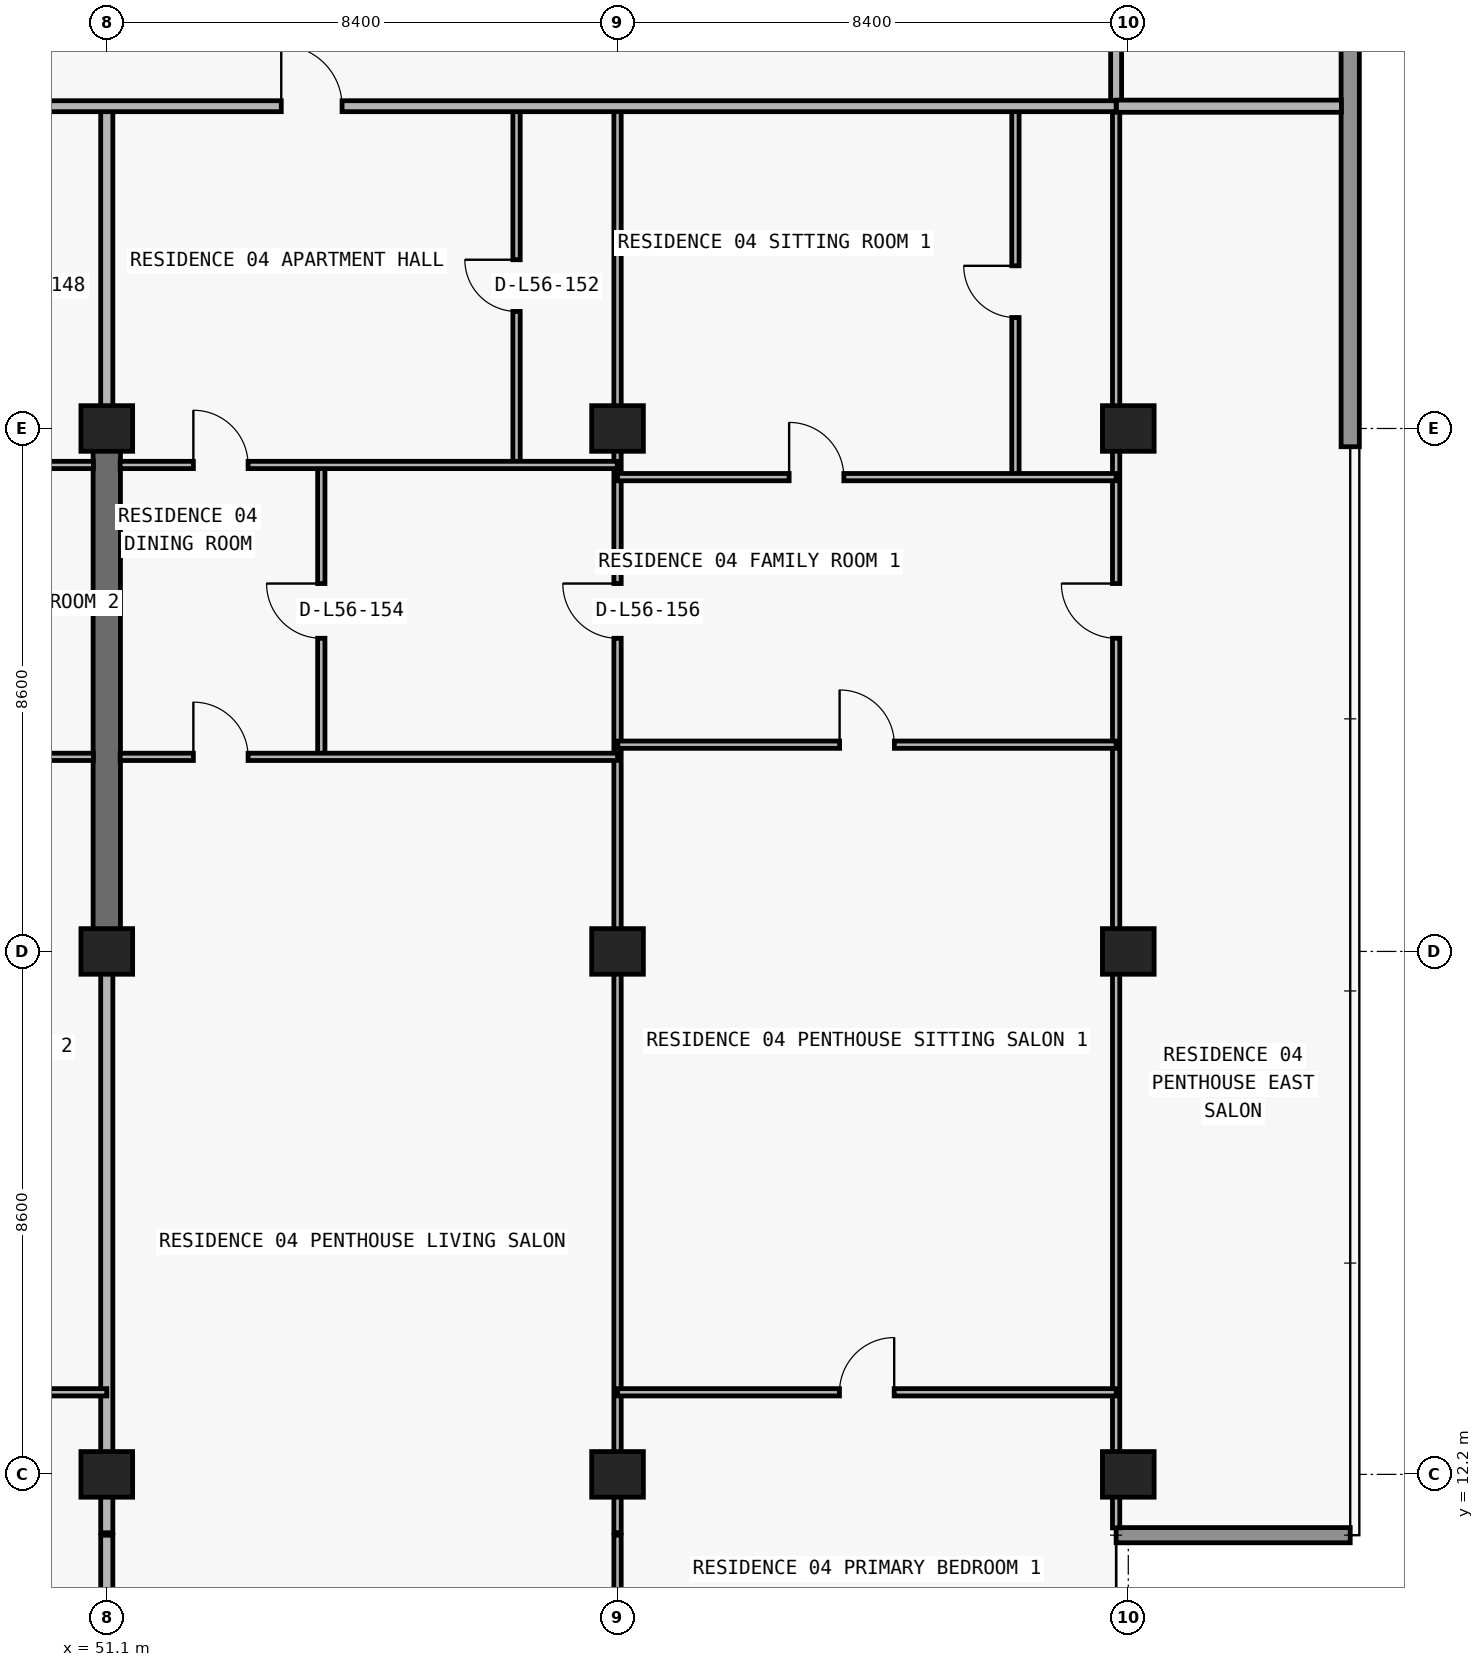
"""IFC4 building model, lengths in metres.
Left out: names, types, materials, properties, quantities, classifications, styles, units other than length and angle.
Written with IfcOpenShell. Run it as: python <this file> out.ifc"""

import sys

from ifc_helpers import new_model, si_unit, direction, frame, frame_2d, origin, origin_2d, place, context, subcontext, project, spatial, rectangle, extrude, element, fill, save


model = new_model("IFC4")
c1 = context("Model", 3, precision=1e-05, world=origin(), true_north=direction((0.0, 1.0)))
c2 = subcontext(c1, "Body", "Model", "MODEL_VIEW")
j1 = project(units=[si_unit("LENGTHUNIT", "METRE"), si_unit("PLANEANGLEUNIT", "RADIAN")], contexts=[c1])
p1 = place(None, origin())
s1 = spatial("IfcSite", under=j1, at=p1, CompositionType="ELEMENT")
p2 = place(p1, origin())
s2 = spatial("IfcBuilding", under=s1, at=p2, CompositionType="ELEMENT")
p3 = place(p2, frame((0.0, 0.0, 201.6)))
s3 = spatial("IfcBuildingStorey", under=s2, at=p3, CompositionType="ELEMENT", Elevation=201.6)
for number, where, z_axis, x_axis in (
    (1, (51.1, 12.2, 0.0), (0.0, 0.0, 1.0), (1.0, 0.0, 0.0)),
    (2, (59.5, 12.2, 0.0), (0.0, 0.0, 1.0), (1.0, 0.0, 0.0)),
    (3, (67.9, 12.2, 0.0), (0.0, 0.0, 1.0), (1.0, 0.0, 0.0)),
    (4, (51.1, 20.8, 0.0), (0.0, 0.0, 1.0), (1.0, 0.0, 0.0)),
    (5, (59.5, 20.8, 0.0), (0.0, 0.0, 1.0), (1.0, 0.0, 0.0)),
    (6, (67.9, 20.8, 0.0), (0.0, 0.0, 1.0), (1.0, 0.0, 0.0)),
    (7, (51.1, 29.4, 0.0), (0.0, 0.0, 1.0), (1.0, 0.0, 0.0)),
    (8, (59.5, 29.4, 0.0), (0.0, 0.0, 1.0), (1.0, 0.0, 0.0)),
    (9, (67.9, 29.4, 0.0), (0.0, 0.0, 1.0), (1.0, 0.0, 0.0)),
):
    element("IfcColumn", number, at=place(p3, frame(where, z_axis=z_axis, x_axis=x_axis)), inside=s3, PredefinedType="COLUMN", context=c2, shape_type="SweptSolid", body=[
        extrude(rectangle(XDim=0.85, YDim=0.75, at=origin_2d()), origin(), (0.0, 0.0, 1.0), 3.05),
    ])
p4 = place(p3, frame((51.1, 20.8, 0.0), z_axis=(0.0, 0.0, 1.0), x_axis=(0.0, 1.0, 0.0)))
e10 = element("IfcWall", 10, at=p4, inside=s3, PredefinedType="SHEAR", context=c2, shape_type="SweptSolid", body=[
    extrude(rectangle(XDim=8.6, YDim=0.45, at=frame_2d((4.3, 0.0))), origin(), (0.0, 0.0, 1.0), 3.05),
])
p5 = place(p3, frame((67.7, 11.2, 0.0), z_axis=(0.0, 0.0, 1.0), x_axis=(1.0, 0.0, 0.0)))
e11 = element("IfcWall", 11, at=p5, inside=s3, PredefinedType="ELEMENTEDWALL", context=c2, shape_type="SweptSolid", body=[
    extrude(rectangle(XDim=3.85, YDim=0.25, at=frame_2d((1.925, 0.0))), origin(), (0.0, 0.0, 1.0), 3.05),
])
p6 = place(p3, frame((71.55, 47.0, 0.0), z_axis=(0.0, 0.0, 1.0), x_axis=(0.0, -1.0, 0.0)))
e12 = element("IfcWall", 12, at=p6, inside=s3, PredefinedType="STANDARD", context=c2, shape_type="SweptSolid", body=[
    extrude(rectangle(XDim=17.9, YDim=0.3, at=frame_2d((8.95, 0.0))), origin(), (0.0, 0.0, 1.0), 3.05),
])
p7 = place(p3, frame((51.1, 7.895, 0.0), z_axis=(0.0, 0.0, 1.0), x_axis=(0.0, 1.0, 0.0)))
e13 = element("IfcWall", 13, at=p7, inside=s3, PredefinedType="PARTITIONING", context=c2, shape_type="SweptSolid", body=[
    extrude(rectangle(XDim=3.305, YDim=0.2, at=frame_2d((1.652, 0.0))), origin(), (0.0, 0.0, 1.0), 3.05),
])
p8 = place(p3, frame((51.1, 11.24, 0.0), z_axis=(0.0, 0.0, 1.0), x_axis=(0.0, 1.0, 0.0)))
e14 = element("IfcWall", 14, at=p8, inside=s3, PredefinedType="PARTITIONING", context=c2, shape_type="SweptSolid", body=[
    extrude(rectangle(XDim=9.555, YDim=0.2, at=frame_2d((4.777, 0.0))), origin(), (0.0, 0.0, 1.0), 2.263),
])
p9 = place(p3, frame((51.1, 29.405, 0.0), z_axis=(0.0, 0.0, 1.0), x_axis=(0.0, 1.0, 0.0)))
e15 = element("IfcWall", 15, at=p9, inside=s3, PredefinedType="PARTITIONING", context=c2, shape_type="SweptSolid", body=[
    extrude(rectangle(XDim=5.295, YDim=0.2, at=frame_2d((2.647, 0.0))), origin(), (0.0, 0.0, 1.0), 2.335),
])
p10 = place(p3, frame((54.628, 24.0, 0.0), z_axis=(0.0, 0.0, 1.0), x_axis=(0.0, 1.0, 0.0)))
e16 = element("IfcWall", 16, at=p10, inside=s3, PredefinedType="PARTITIONING", context=c2, shape_type="SweptSolid", body=[
    extrude(rectangle(XDim=4.8, YDim=0.12, at=frame_2d((2.4, 0.0))), origin(), (0.0, 0.0, 1.0), 3.05),
])
p11 = place(p10, frame((1.95, 0.0, 0.0)))
e17 = element("IfcOpeningElement", 17, at=p11, cuts=e16, PredefinedType="OPENING", context=c2, shape_type="SweptSolid", body=[
    extrude(rectangle(XDim=0.9, YDim=2.15, at=frame_2d((0.45, 1.075))), frame((0.0, 0.07, 0.0), z_axis=(0.0, -1.0, 0.0), x_axis=(1.0, 0.0, 0.0)), (0.0, 0.0, 1.0), 0.14),
])
p12 = place(p3, frame((57.839, 28.8, 0.0), z_axis=(0.0, 0.0, 1.0), x_axis=(0.0, 1.0, 0.0)))
e18 = element("IfcWall", 18, at=p12, inside=s3, PredefinedType="PARTITIONING", context=c2, shape_type="SweptSolid", body=[
    extrude(rectangle(XDim=5.9, YDim=0.12, at=frame_2d((2.95, 0.0))), origin(), (0.0, 0.0, 1.0), 3.05),
])
p13 = place(p12, frame((2.525, 0.0, 0.0)))
e19 = element("IfcOpeningElement", 19, at=p13, cuts=e18, PredefinedType="OPENING", context=c2, shape_type="SweptSolid", body=[
    extrude(rectangle(XDim=0.85, YDim=2.1, at=frame_2d((0.425, 1.05))), frame((0.0, 0.07, 0.0), z_axis=(0.0, -1.0, 0.0), x_axis=(1.0, 0.0, 0.0)), (0.0, 0.0, 1.0), 0.14),
])
p14 = place(p3, frame((59.5, 7.895, 0.0), z_axis=(0.0, 0.0, 1.0), x_axis=(0.0, 1.0, 0.0)))
e20 = element("IfcWall", 20, at=p14, inside=s3, PredefinedType="PARTITIONING", context=c2, shape_type="SweptSolid", body=[
    extrude(rectangle(XDim=3.305, YDim=0.12, at=frame_2d((1.652, 0.0))), origin(), (0.0, 0.0, 1.0), 3.05),
])
p15 = place(p3, frame((59.5, 11.24, 0.0), z_axis=(0.0, 0.0, 1.0), x_axis=(0.0, 1.0, 0.0)))
e21 = element("IfcWall", 21, at=p15, inside=s3, PredefinedType="PARTITIONING", context=c2, shape_type="SweptSolid", body=[
    extrude(rectangle(XDim=23.46, YDim=0.12, at=frame_2d((11.73, 0.0))), origin(), (0.0, 0.0, 1.0), 2.263),
])
p16 = place(p15, frame((14.71, 0.0, 0.0)))
e22 = element("IfcOpeningElement", 22, at=p16, cuts=e21, PredefinedType="OPENING", context=c2, shape_type="SweptSolid", body=[
    extrude(rectangle(XDim=0.9, YDim=2.15, at=frame_2d((0.45, 1.075))), frame((0.0, 0.07, 0.0), z_axis=(0.0, -1.0, 0.0), x_axis=(1.0, 0.0, 0.0)), (0.0, 0.0, 1.0), 0.14),
])
p17 = place(p3, frame((66.044, 28.6, 0.0), z_axis=(0.0, 0.0, 1.0), x_axis=(0.0, 1.0, 0.0)))
e23 = element("IfcWall", 23, at=p17, inside=s3, PredefinedType="PARTITIONING", context=c2, shape_type="SweptSolid", body=[
    extrude(rectangle(XDim=6.1, YDim=0.12, at=frame_2d((3.05, 0.0))), origin(), (0.0, 0.0, 1.0), 3.05),
])
p18 = place(p17, frame((2.625, 0.0, 0.0)))
e24 = element("IfcOpeningElement", 24, at=p18, cuts=e23, PredefinedType="OPENING", context=c2, shape_type="SweptSolid", body=[
    extrude(rectangle(XDim=0.85, YDim=2.1, at=frame_2d((0.425, 1.05))), frame((0.0, 0.07, 0.0), z_axis=(0.0, -1.0, 0.0), x_axis=(1.0, 0.0, 0.0)), (0.0, 0.0, 1.0), 0.14),
])
p19 = place(p3, frame((67.7, 11.32, 0.0), z_axis=(0.0, 0.0, 1.0), x_axis=(0.0, 1.0, 0.0)))
e25 = element("IfcWall", 25, at=p19, inside=s3, PredefinedType="PARTITIONING", context=c2, shape_type="SweptSolid", body=[
    extrude(rectangle(XDim=23.38, YDim=0.12, at=frame_2d((11.69, 0.0))), origin(), (0.0, 0.0, 1.0), 2.263),
])
p20 = place(p19, frame((14.63, 0.0, 0.0)))
e26 = element("IfcOpeningElement", 26, at=p20, cuts=e25, PredefinedType="OPENING", context=c2, shape_type="SweptSolid", body=[
    extrude(rectangle(XDim=0.9, YDim=2.15, at=frame_2d((0.45, 1.075))), frame((0.0, 0.07, 0.0), z_axis=(0.0, -1.0, 0.0), x_axis=(1.0, 0.0, 0.0)), (0.0, 0.0, 1.0), 0.14),
])
p21 = place(p3, frame((67.7, 34.705, 0.0), z_axis=(0.0, 0.0, 1.0), x_axis=(0.0, 1.0, 0.0)))
e27 = element("IfcWall", 27, at=p21, inside=s3, PredefinedType="PARTITIONING", context=c2, shape_type="SweptSolid", body=[
    extrude(rectangle(XDim=2.295, YDim=0.18, at=frame_2d((1.147, 0.0))), origin(), (0.0, 0.0, 1.0), 2.263),
])
p22 = place(p3, frame((41.2, 13.55, 0.0), z_axis=(0.0, 0.0, 1.0), x_axis=(1.0, 0.0, 0.0)))
e28 = element("IfcWall", 28, at=p22, inside=s3, PredefinedType="PARTITIONING", context=c2, shape_type="SweptSolid", body=[
    extrude(rectangle(XDim=9.9, YDim=0.12, at=frame_2d((4.95, 0.0))), origin(), (0.0, 0.0, 1.0), 3.05),
])
p23 = place(p22, frame((5.25, 0.0, 0.0)))
e29 = element("IfcOpeningElement", 29, at=p23, cuts=e28, PredefinedType="OPENING", context=c2, shape_type="SweptSolid", body=[
    extrude(rectangle(XDim=0.9, YDim=2.15, at=frame_2d((0.45, 1.075))), frame((0.0, 0.07, 0.0), z_axis=(0.0, -1.0, 0.0), x_axis=(1.0, 0.0, 0.0)), (0.0, 0.0, 1.0), 0.14),
])
p24 = place(p3, frame((59.5, 13.55, 0.0), z_axis=(0.0, 0.0, 1.0), x_axis=(1.0, 0.0, 0.0)))
e30 = element("IfcWall", 30, at=p24, inside=s3, PredefinedType="PARTITIONING", context=c2, shape_type="SweptSolid", body=[
    extrude(rectangle(XDim=8.2, YDim=0.12, at=frame_2d((4.1, 0.0))), origin(), (0.0, 0.0, 1.0), 3.05),
])
p25 = place(p24, frame((3.65, 0.0, 0.0)))
e31 = element("IfcOpeningElement", 31, at=p25, cuts=e30, PredefinedType="OPENING", context=c2, shape_type="SweptSolid", body=[
    extrude(rectangle(XDim=0.9, YDim=2.15, at=frame_2d((0.45, 1.075))), frame((0.0, 0.07, 0.0), z_axis=(0.0, -1.0, 0.0), x_axis=(1.0, 0.0, 0.0)), (0.0, 0.0, 1.0), 0.14),
])
p26 = place(p3, frame((42.7, 24.0, 0.0), z_axis=(0.0, 0.0, 1.0), x_axis=(1.0, 0.0, 0.0)))
e32 = element("IfcWall", 32, at=p26, inside=s3, PredefinedType="PARTITIONING", context=c2, shape_type="SweptSolid", body=[
    extrude(rectangle(XDim=8.18, YDim=0.12, at=frame_2d((4.09, 0.0))), origin(), (0.0, 0.0, 1.0), 3.05),
])
p27 = place(p26, frame((3.64, 0.0, 0.0)))
e33 = element("IfcOpeningElement", 33, at=p27, cuts=e32, PredefinedType="OPENING", context=c2, shape_type="SweptSolid", body=[
    extrude(rectangle(XDim=0.9, YDim=2.15, at=frame_2d((0.45, 1.075))), frame((0.0, 0.07, 0.0), z_axis=(0.0, -1.0, 0.0), x_axis=(1.0, 0.0, 0.0)), (0.0, 0.0, 1.0), 0.14),
])
p28 = place(p3, frame((51.32, 24.0, 0.0), z_axis=(0.0, 0.0, 1.0), x_axis=(1.0, 0.0, 0.0)))
e34 = element("IfcWall", 34, at=p28, inside=s3, PredefinedType="PARTITIONING", context=c2, shape_type="SweptSolid", body=[
    extrude(rectangle(XDim=8.18, YDim=0.12, at=frame_2d((4.09, 0.0))), origin(), (0.0, 0.0, 1.0), 3.05),
])
p29 = place(p28, frame((1.204, 0.0, 0.0)))
e35 = element("IfcOpeningElement", 35, at=p29, cuts=e34, PredefinedType="OPENING", context=c2, shape_type="SweptSolid", body=[
    extrude(rectangle(XDim=0.9, YDim=2.15, at=frame_2d((0.45, 1.075))), frame((0.0, 0.07, 0.0), z_axis=(0.0, -1.0, 0.0), x_axis=(1.0, 0.0, 0.0)), (0.0, 0.0, 1.0), 0.14),
])
p30 = place(p3, frame((59.505, 24.2, 0.0), z_axis=(0.0, 0.0, 1.0), x_axis=(1.0, 0.0, 0.0)))
e36 = element("IfcWall", 36, at=p30, inside=s3, PredefinedType="PARTITIONING", context=c2, shape_type="SweptSolid", body=[
    extrude(rectangle(XDim=8.195, YDim=0.12, at=frame_2d((4.098, 0.0))), origin(), (0.0, 0.0, 1.0), 3.05),
])
p31 = place(p30, frame((3.647, 0.0, 0.0)))
e37 = element("IfcOpeningElement", 37, at=p31, cuts=e36, PredefinedType="OPENING", context=c2, shape_type="SweptSolid", body=[
    extrude(rectangle(XDim=0.9, YDim=2.15, at=frame_2d((0.45, 1.075))), frame((0.0, 0.07, 0.0), z_axis=(0.0, -1.0, 0.0), x_axis=(1.0, 0.0, 0.0)), (0.0, 0.0, 1.0), 0.14),
])
p32 = place(p3, frame((59.5, 28.6, 0.0), z_axis=(0.0, 0.0, 1.0), x_axis=(1.0, 0.0, 0.0)))
e38 = element("IfcWall", 38, at=p32, inside=s3, PredefinedType="PARTITIONING", context=c2, shape_type="SweptSolid", body=[
    extrude(rectangle(XDim=8.2, YDim=0.12, at=frame_2d((4.1, 0.0))), origin(), (0.0, 0.0, 1.0), 3.05),
])
p33 = place(p32, frame((2.822, 0.0, 0.0)))
e39 = element("IfcOpeningElement", 39, at=p33, cuts=e38, PredefinedType="OPENING", context=c2, shape_type="SweptSolid", body=[
    extrude(rectangle(XDim=0.9, YDim=2.15, at=frame_2d((0.45, 1.075))), frame((0.0, 0.07, 0.0), z_axis=(0.0, -1.0, 0.0), x_axis=(1.0, 0.0, 0.0)), (0.0, 0.0, 1.0), 0.14),
])
p34 = place(p3, frame((42.705, 28.8, 0.0), z_axis=(0.0, 0.0, 1.0), x_axis=(1.0, 0.0, 0.0)))
e40 = element("IfcWall", 40, at=p34, inside=s3, PredefinedType="PARTITIONING", context=c2, shape_type="SweptSolid", body=[
    extrude(rectangle(XDim=8.175, YDim=0.12, at=frame_2d((4.087, 0.0))), origin(), (0.0, 0.0, 1.0), 3.05),
])
p35 = place(p34, frame((2.892, 0.0, 0.0)))
e41 = element("IfcOpeningElement", 41, at=p35, cuts=e40, PredefinedType="OPENING", context=c2, shape_type="SweptSolid", body=[
    extrude(rectangle(XDim=0.9, YDim=2.15, at=frame_2d((0.45, 1.075))), frame((0.0, 0.07, 0.0), z_axis=(0.0, -1.0, 0.0), x_axis=(1.0, 0.0, 0.0)), (0.0, 0.0, 1.0), 0.14),
])
p36 = place(p3, frame((51.32, 28.8, 0.0), z_axis=(0.0, 0.0, 1.0), x_axis=(1.0, 0.0, 0.0)))
e42 = element("IfcWall", 42, at=p36, inside=s3, PredefinedType="PARTITIONING", context=c2, shape_type="SweptSolid", body=[
    extrude(rectangle(XDim=8.175, YDim=0.12, at=frame_2d((4.087, 0.0))), origin(), (0.0, 0.0, 1.0), 3.05),
])
p37 = place(p36, frame((1.204, 0.0, 0.0)))
e43 = element("IfcOpeningElement", 43, at=p37, cuts=e42, PredefinedType="OPENING", context=c2, shape_type="SweptSolid", body=[
    extrude(rectangle(XDim=0.9, YDim=2.15, at=frame_2d((0.45, 1.075))), frame((0.0, 0.07, 0.0), z_axis=(0.0, -1.0, 0.0), x_axis=(1.0, 0.0, 0.0)), (0.0, 0.0, 1.0), 0.14),
])
p38 = place(p3, frame((41.2, 34.7, 0.0), z_axis=(0.0, 0.0, 1.0), x_axis=(1.0, 0.0, 0.0)))
e44 = element("IfcWall", 44, at=p38, inside=s3, PredefinedType="PARTITIONING", context=c2, shape_type="SweptSolid", body=[
    extrude(rectangle(XDim=26.5, YDim=0.18, at=frame_2d((13.25, 0.0))), origin(), (0.0, 0.0, 1.0), 3.05),
])
p39 = place(p38, frame((12.77, 0.0, 0.0)))
e45 = element("IfcOpeningElement", 45, at=p39, cuts=e44, PredefinedType="OPENING", context=c2, shape_type="SweptSolid", body=[
    extrude(rectangle(XDim=1.0, YDim=2.2, at=frame_2d((0.5, 1.1))), frame((0.0, 0.1, 0.0), z_axis=(0.0, -1.0, 0.0), x_axis=(1.0, 0.0, 0.0)), (0.0, 0.0, 1.0), 0.2),
])
p40 = place(p3, frame((67.705, 34.7, 0.0), z_axis=(0.0, 0.0, 1.0), x_axis=(1.0, 0.0, 0.0)))
e46 = element("IfcWall", 46, at=p40, inside=s3, PredefinedType="PARTITIONING", context=c2, shape_type="SweptSolid", body=[
    extrude(rectangle(XDim=3.7, YDim=0.2, at=frame_2d((1.85, 0.0))), origin(), (0.0, 0.0, 1.0), 3.05),
])
p41 = place(p39, origin())
e47 = element("IfcDoor", 47, at=p41, inside=s3, OperationType="SINGLE_SWING_LEFT", PredefinedType="DOOR", context=c2, shape_type="SweptSolid", body=[
    extrude(rectangle(XDim=1.0, YDim=2.2, at=frame_2d((0.5, 1.1))), frame((0.0, 0.025, 0.0), z_axis=(0.0, -1.0, 0.0), x_axis=(1.0, 0.0, 0.0)), (0.0, 0.0, 1.0), 0.05),
])
fill(e45, e47)
p42 = place(p13, origin())
e48 = element("IfcDoor", 48, at=p42, inside=s3, OperationType="SINGLE_SWING_RIGHT", PredefinedType="DOOR", context=c2, shape_type="SweptSolid", body=[
    extrude(rectangle(XDim=0.85, YDim=2.1, at=frame_2d((0.425, 1.05))), frame((0.0, 0.025, 0.0), z_axis=(0.0, -1.0, 0.0), x_axis=(1.0, 0.0, 0.0)), (0.0, 0.0, 1.0), 0.05),
])
fill(e19, e48)
p43 = place(p37, origin())
e49 = element("IfcDoor", 49, at=p43, inside=s3, OperationType="SINGLE_SWING_LEFT", PredefinedType="DOOR", context=c2, shape_type="SweptSolid", body=[
    extrude(rectangle(XDim=0.9, YDim=2.15, at=frame_2d((0.45, 1.075))), frame((0.0, 0.025, 0.0), z_axis=(0.0, -1.0, 0.0), x_axis=(1.0, 0.0, 0.0)), (0.0, 0.0, 1.0), 0.05),
])
fill(e43, e49)
p44 = place(p11, origin())
e50 = element("IfcDoor", 50, at=p44, inside=s3, OperationType="SINGLE_SWING_RIGHT", PredefinedType="DOOR", context=c2, shape_type="SweptSolid", body=[
    extrude(rectangle(XDim=0.9, YDim=2.15, at=frame_2d((0.45, 1.075))), frame((0.0, 0.025, 0.0), z_axis=(0.0, -1.0, 0.0), x_axis=(1.0, 0.0, 0.0)), (0.0, 0.0, 1.0), 0.05),
])
fill(e17, e50)
p45 = place(p29, origin())
e51 = element("IfcDoor", 51, at=p45, inside=s3, OperationType="SINGLE_SWING_LEFT", PredefinedType="DOOR", context=c2, shape_type="SweptSolid", body=[
    extrude(rectangle(XDim=0.9, YDim=2.15, at=frame_2d((0.45, 1.075))), frame((0.0, 0.025, 0.0), z_axis=(0.0, -1.0, 0.0), x_axis=(1.0, 0.0, 0.0)), (0.0, 0.0, 1.0), 0.05),
])
fill(e35, e51)
p46 = place(p16, origin())
e52 = element("IfcDoor", 52, at=p46, inside=s3, OperationType="SINGLE_SWING_RIGHT", PredefinedType="DOOR", context=c2, shape_type="SweptSolid", body=[
    extrude(rectangle(XDim=0.9, YDim=2.15, at=frame_2d((0.45, 1.075))), frame((0.0, 0.025, 0.0), z_axis=(0.0, -1.0, 0.0), x_axis=(1.0, 0.0, 0.0)), (0.0, 0.0, 1.0), 0.05),
])
fill(e22, e52)
p47 = place(p33, origin())
e53 = element("IfcDoor", 53, at=p47, inside=s3, OperationType="SINGLE_SWING_LEFT", PredefinedType="DOOR", context=c2, shape_type="SweptSolid", body=[
    extrude(rectangle(XDim=0.9, YDim=2.15, at=frame_2d((0.45, 1.075))), frame((0.0, 0.025, 0.0), z_axis=(0.0, -1.0, 0.0), x_axis=(1.0, 0.0, 0.0)), (0.0, 0.0, 1.0), 0.05),
])
fill(e39, e53)
p48 = place(p18, origin())
e54 = element("IfcDoor", 54, at=p48, inside=s3, OperationType="SINGLE_SWING_RIGHT", PredefinedType="DOOR", context=c2, shape_type="SweptSolid", body=[
    extrude(rectangle(XDim=0.85, YDim=2.1, at=frame_2d((0.425, 1.05))), frame((0.0, 0.025, 0.0), z_axis=(0.0, -1.0, 0.0), x_axis=(1.0, 0.0, 0.0)), (0.0, 0.0, 1.0), 0.05),
])
fill(e24, e54)
p49 = place(p31, origin())
e55 = element("IfcDoor", 55, at=p49, inside=s3, OperationType="SINGLE_SWING_LEFT", PredefinedType="DOOR", context=c2, shape_type="SweptSolid", body=[
    extrude(rectangle(XDim=0.9, YDim=2.15, at=frame_2d((0.45, 1.075))), frame((0.0, 0.025, 0.0), z_axis=(0.0, -1.0, 0.0), x_axis=(1.0, 0.0, 0.0)), (0.0, 0.0, 1.0), 0.05),
])
fill(e37, e55)
p50 = place(p25, origin())
e56 = element("IfcDoor", 56, at=p50, inside=s3, OperationType="SINGLE_SWING_RIGHT", PredefinedType="DOOR", context=c2, shape_type="SweptSolid", body=[
    extrude(rectangle(XDim=0.9, YDim=2.15, at=frame_2d((0.45, 1.075))), frame((0.0, 0.025, 0.0), z_axis=(0.0, -1.0, 0.0), x_axis=(1.0, 0.0, 0.0)), (0.0, 0.0, 1.0), 0.05),
])
fill(e31, e56)
p51 = place(p20, origin())
e57 = element("IfcDoor", 57, at=p51, inside=s3, OperationType="SINGLE_SWING_RIGHT", PredefinedType="DOOR", context=c2, shape_type="SweptSolid", body=[
    extrude(rectangle(XDim=0.9, YDim=2.15, at=frame_2d((0.45, 1.075))), frame((0.0, 0.025, 0.0), z_axis=(0.0, -1.0, 0.0), x_axis=(1.0, 0.0, 0.0)), (0.0, 0.0, 1.0), 0.05),
])
fill(e26, e57)
save(model, sys.argv[1])
